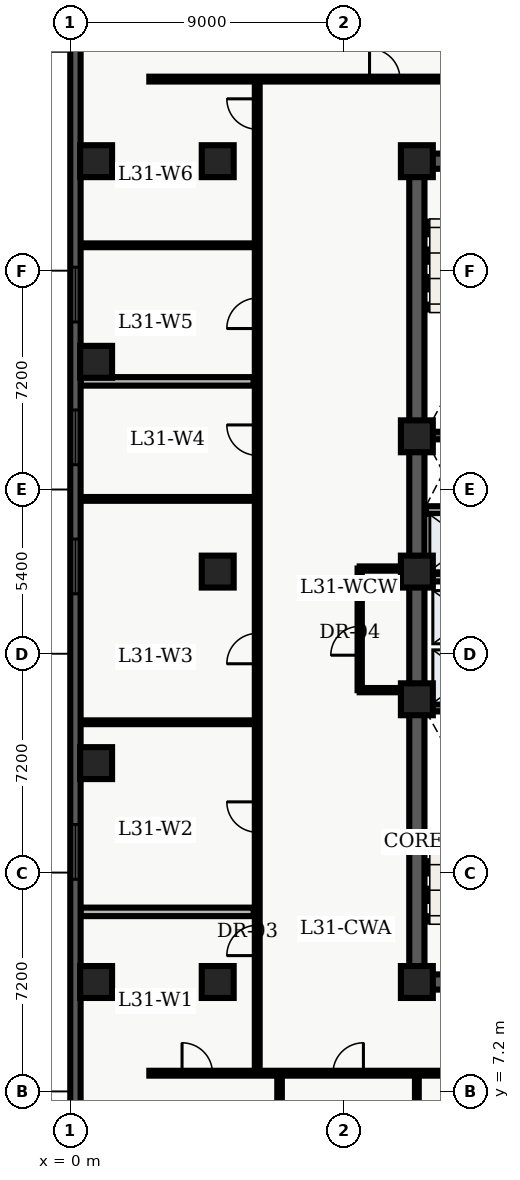
"""IFC4 building model, lengths in metres.
Left out: names, types, materials, properties, quantities, classifications, styles, units other than length and angle.
Written with IfcOpenShell. Run it as: python <this file> out.ifc"""

import sys

from ifc_helpers import new_model, entity, si_unit, converted_unit, direction, frame, origin_with_axes, origin_2d_with_axis, place, context, subcontext, project, spatial, polyline, rectangle, outline, extrude, element, fill, save


model = new_model("IFC4")
c1 = context("Model", 3, precision=1e-05, world=origin_with_axes(), true_north=direction((0.0, 1.0)))
c2 = subcontext(c1, "Body", "Model", "MODEL_VIEW")
j1 = project(units=[si_unit("LENGTHUNIT", "METRE"), converted_unit("PLANEANGLEUNIT", "DEGREE", entity("IfcPlaneAngleMeasure", 0.017), si_unit("PLANEANGLEUNIT", "RADIAN"), dimensions=[0, 0, 0, 0, 0, 0, 0])], contexts=[c1])
p1 = place(None, origin_with_axes())
s1 = spatial("IfcSite", under=j1, at=p1, CompositionType="ELEMENT")
p2 = place(p1, origin_with_axes())
s2 = spatial("IfcBuilding", under=s1, at=p2, CompositionType="ELEMENT")
p3 = place(p2, frame((0.0, 0.0, 129.0), z_axis=(0.0, 0.0, 1.0), x_axis=(1.0, 0.0, 0.0)))
s3 = spatial("IfcBuildingStorey", under=s2, at=p3, CompositionType="ELEMENT", Elevation=129.0)
p4 = place(p3, frame((11.4, 10.8, 0.0), z_axis=(0.0, 0.0, 1.0), x_axis=(0.0, 1.0, 0.0)))
e1 = element("IfcWall", 1, at=p4, inside=s3, PredefinedType="SHEAR", context=c2, shape_type="SweptSolid", body=[
    extrude(outline(polyline([(0.0, -0.25), (27.0, -0.25), (27.0, 0.25), (0.0, 0.25), (0.0, -0.25)])), origin_with_axes(), (0.0, 0.0, 1.0), 3.66),
])
p5 = place(p3, frame((11.4, 10.8, 0.0), z_axis=(0.0, 0.0, 1.0), x_axis=(1.0, 0.0, 0.0)))
e2 = element("IfcWall", 2, at=p5, inside=s3, PredefinedType="SHEAR", context=c2, shape_type="SweptSolid", body=[
    extrude(outline(polyline([(0.0, -0.25), (7.2, -0.25), (7.2, 0.25), (0.0, 0.25), (0.0, -0.25)])), origin_with_axes(), (0.0, 0.0, 1.0), 3.66),
])
p6 = place(p5, frame((2.625, 0.0, 0.0), z_axis=(0.0, 0.0, 1.0), x_axis=(1.0, 0.0, 0.0)))
e3 = element("IfcOpeningElement", 3, at=p6, cuts=e2, PredefinedType="OPENING", context=c2, shape_type="SweptSolid", body=[
    extrude(rectangle(XDim=1.05, YDim=0.52, at=origin_2d_with_axis()), origin_with_axes(), (0.0, 0.0, 1.0), 2.15),
])
p7 = place(p3, frame((11.4, 37.8, 0.0), z_axis=(0.0, 0.0, 1.0), x_axis=(1.0, 0.0, 0.0)))
e4 = element("IfcWall", 4, at=p7, inside=s3, PredefinedType="SHEAR", context=c2, shape_type="SweptSolid", body=[
    extrude(outline(polyline([(0.0, -0.25), (7.2, -0.25), (7.2, 0.25), (0.0, 0.25), (0.0, -0.25)])), origin_with_axes(), (0.0, 0.0, 1.0), 3.66),
])
p8 = place(p7, frame((2.625, 0.0, 0.0), z_axis=(0.0, 0.0, 1.0), x_axis=(1.0, 0.0, 0.0)))
e5 = element("IfcOpeningElement", 5, at=p8, cuts=e4, PredefinedType="OPENING", context=c2, shape_type="SweptSolid", body=[
    extrude(rectangle(XDim=1.05, YDim=0.52, at=origin_2d_with_axis()), origin_with_axes(), (0.0, 0.0, 1.0), 2.15),
])
for number, where, z_axis, x_axis in (
    (6, (11.65, 19.825, 0.0), (0.0, 0.0, 1.0), (1.0, 0.0, 0.0)),
    (7, (11.65, 28.775, 0.0), (0.0, 0.0, 1.0), (1.0, 0.0, 0.0)),
):
    element("IfcWall", number, at=place(p3, frame(where, z_axis=z_axis, x_axis=x_axis)), inside=s3, PredefinedType="SHEAR", context=c2, shape_type="SweptSolid", body=[
        extrude(outline(polyline([(0.0, -0.125), (6.7, -0.125), (6.7, 0.125), (0.0, 0.125), (0.0, -0.125)])), origin_with_axes(), (0.0, 0.0, 1.0), 3.66),
    ])
p9 = place(p3, frame((11.7, 24.1, 0.0), z_axis=(0.0, 0.0, 1.0), x_axis=(1.0, 0.0, 0.0)))
e8 = element("IfcWall", 8, at=p9, inside=s3, PredefinedType="SOLIDWALL", context=c2, shape_type="SweptSolid", body=[
    extrude(outline(polyline([(0.0, -0.125), (6.6, -0.125), (6.6, 0.125), (0.0, 0.125), (0.0, -0.125)])), origin_with_axes(), (0.0, 0.0, 1.0), 2.7),
])
p10 = place(p9, frame((3.75, 0.0, 0.0), z_axis=(0.0, 0.0, 1.0), x_axis=(1.0, 0.0, 0.0)))
e9 = element("IfcOpeningElement", 9, at=p10, cuts=e8, PredefinedType="OPENING", context=c2, shape_type="SweptSolid", body=[
    extrude(rectangle(XDim=0.9, YDim=0.27, at=origin_2d_with_axis()), origin_with_axes(), (0.0, 0.0, 1.0), 2.15),
])
p11 = place(p3, frame((11.7, 26.325, 0.0), z_axis=(0.0, 0.0, 1.0), x_axis=(1.0, 0.0, 0.0)))
e10 = element("IfcWall", 10, at=p11, inside=s3, PredefinedType="SOLIDWALL", context=c2, shape_type="SweptSolid", body=[
    extrude(outline(polyline([(0.0, -0.125), (6.6, -0.125), (6.6, 0.125), (0.0, 0.125), (0.0, -0.125)])), origin_with_axes(), (0.0, 0.0, 1.0), 2.7),
])
p12 = place(p11, frame((3.5, 0.0, 0.0), z_axis=(0.0, 0.0, 1.0), x_axis=(1.0, 0.0, 0.0)))
e11 = element("IfcOpeningElement", 11, at=p12, cuts=e10, PredefinedType="OPENING", context=c2, shape_type="SweptSolid", body=[
    extrude(rectangle(XDim=0.9, YDim=0.27, at=origin_2d_with_axis()), origin_with_axes(), (0.0, 0.0, 1.0), 2.15),
])
for number, where, z_axis, x_axis in (
    (12, (11.4, 10.8, 0.0), (0.0, 0.0, 1.0), (1.0, 0.0, 0.0)),
    (13, (11.4, 20.1, 0.0), (0.0, 0.0, 1.0), (1.0, 0.0, 0.0)),
    (14, (11.4, 24.3, 0.0), (0.0, 0.0, 1.0), (1.0, 0.0, 0.0)),
    (15, (11.4, 28.75, 0.0), (0.0, 0.0, 1.0), (1.0, 0.0, 0.0)),
    (16, (11.4, 37.8, 0.0), (0.0, 0.0, 1.0), (1.0, 0.0, 0.0)),
    (17, (4.85, 10.8, 0.0), (0.0, 0.0, 1.0), (1.0, 0.0, 0.0)),
    (18, (4.85, 24.3, 0.0), (0.0, 0.0, 1.0), (1.0, 0.0, 0.0)),
    (19, (4.85, 37.8, 0.0), (0.0, 0.0, 1.0), (1.0, 0.0, 0.0)),
    (20, (0.85, 10.8, 0.0), (0.0, 0.0, 1.0), (1.0, 0.0, 0.0)),
    (21, (0.85, 18.0, 0.0), (0.0, 0.0, 1.0), (1.0, 0.0, 0.0)),
    (22, (0.85, 31.2, 0.0), (0.0, 0.0, 1.0), (1.0, 0.0, 0.0)),
    (23, (0.85, 37.8, 0.0), (0.0, 0.0, 1.0), (1.0, 0.0, 0.0)),
):
    element("IfcColumn", number, at=place(p3, frame(where, z_axis=z_axis, x_axis=x_axis)), inside=s3, PredefinedType="COLUMN", context=c2, shape_type="SweptSolid", body=[
        extrude(rectangle(XDim=1.05, YDim=1.05, at=origin_2d_with_axis()), origin_with_axes(), (0.0, 0.0, 1.0), 3.9),
    ])
p13 = place(p3, frame((9.52, 20.4, 0.0), z_axis=(0.0, 0.0, 1.0), x_axis=(0.0, 1.0, 0.0)))
e24 = element("IfcWall", 24, at=p13, inside=s3, PredefinedType="PARTITIONING", context=c2, shape_type="SweptSolid", body=[
    extrude(outline(polyline([(0.0, -0.07), (4.0, -0.07), (4.0, 0.07), (0.0, 0.07), (0.0, -0.07)])), origin_with_axes(), (0.0, 0.0, 1.0), 2.7),
])
p14 = place(p13, frame((1.625, 0.0, 0.0), z_axis=(0.0, 0.0, 1.0), x_axis=(1.0, 0.0, 0.0)))
e25 = element("IfcOpeningElement", 25, at=p14, cuts=e24, PredefinedType="OPENING", context=c2, shape_type="SweptSolid", body=[
    extrude(rectangle(XDim=0.95, YDim=0.16, at=origin_2d_with_axis()), origin_with_axes(), (0.0, 0.0, 1.0), 2.15),
])
for number, where, z_axis, x_axis in (
    (26, (9.52, 20.4, 0.0), (0.0, 0.0, 1.0), (1.0, 0.0, 0.0)),
    (27, (9.52, 24.4, 0.0), (0.0, 0.0, 1.0), (1.0, 0.0, 0.0)),
):
    element("IfcWall", number, at=place(p3, frame(where, z_axis=z_axis, x_axis=x_axis)), inside=s3, PredefinedType="PARTITIONING", context=c2, shape_type="SweptSolid", body=[
        extrude(outline(polyline([(0.0, -0.07), (1.58, -0.07), (1.58, 0.07), (0.0, 0.07), (0.0, -0.07)])), origin_with_axes(), (0.0, 0.0, 1.0), 2.7),
    ])
p15 = place(p3, frame((2.6, 7.8, 0.0), z_axis=(0.0, 0.0, 1.0), x_axis=(1.0, 0.0, 0.0)))
e28 = element("IfcWall", 28, at=p15, inside=s3, PredefinedType="PARTITIONING", context=c2, shape_type="SweptSolid", body=[
    extrude(outline(polyline([(0.0, -0.08), (18.55, -0.08), (18.55, 0.08), (0.0, 0.08), (0.0, -0.08)])), origin_with_axes(), (0.0, 0.0, 1.0), 2.7),
])
p16 = place(p15, frame((1.577, 0.0, 0.0), z_axis=(0.0, 0.0, 1.0), x_axis=(1.0, 0.0, 0.0)))
e29 = element("IfcOpeningElement", 29, at=p16, cuts=e28, PredefinedType="OPENING", context=c2, shape_type="SweptSolid", body=[
    extrude(rectangle(XDim=1.0, YDim=0.18, at=origin_2d_with_axis()), origin_with_axes(), (0.0, 0.0, 1.0), 2.15),
])
p17 = place(p15, frame((6.542, 0.0, 0.0), z_axis=(0.0, 0.0, 1.0), x_axis=(1.0, 0.0, 0.0)))
e30 = element("IfcOpeningElement", 30, at=p17, cuts=e28, PredefinedType="OPENING", context=c2, shape_type="SweptSolid", body=[
    extrude(rectangle(XDim=1.0, YDim=0.18, at=origin_2d_with_axis()), origin_with_axes(), (0.0, 0.0, 1.0), 2.15),
])
p18 = place(p15, frame((11.931, 0.0, 0.0), z_axis=(0.0, 0.0, 1.0), x_axis=(1.0, 0.0, 0.0)))
e31 = element("IfcOpeningElement", 31, at=p18, cuts=e28, PredefinedType="OPENING", context=c2, shape_type="SweptSolid", body=[
    extrude(rectangle(XDim=1.0, YDim=0.18, at=origin_2d_with_axis()), origin_with_axes(), (0.0, 0.0, 1.0), 2.15),
])
p19 = place(p15, frame((16.502, 0.0, 0.0), z_axis=(0.0, 0.0, 1.0), x_axis=(1.0, 0.0, 0.0)))
e32 = element("IfcOpeningElement", 32, at=p19, cuts=e28, PredefinedType="OPENING", context=c2, shape_type="SweptSolid", body=[
    extrude(rectangle(XDim=1.0, YDim=0.18, at=origin_2d_with_axis()), origin_with_axes(), (0.0, 0.0, 1.0), 2.15),
])
p20 = place(p3, frame((2.6, 40.5, 0.0), z_axis=(0.0, 0.0, 1.0), x_axis=(1.0, 0.0, 0.0)))
e33 = element("IfcWall", 33, at=p20, inside=s3, PredefinedType="PARTITIONING", context=c2, shape_type="SweptSolid", body=[
    extrude(outline(polyline([(0.0, -0.08), (18.693, -0.08), (18.693, 0.08), (0.0, 0.08), (0.0, -0.08)])), origin_with_axes(), (0.0, 0.0, 1.0), 2.7),
])
p21 = place(p20, frame((7.744, 0.0, 0.0), z_axis=(0.0, 0.0, 1.0), x_axis=(1.0, 0.0, 0.0)))
e34 = element("IfcOpeningElement", 34, at=p21, cuts=e33, PredefinedType="OPENING", context=c2, shape_type="SweptSolid", body=[
    extrude(rectangle(XDim=1.0, YDim=0.18, at=origin_2d_with_axis()), origin_with_axes(), (0.0, 0.0, 1.0), 2.15),
])
p22 = place(p3, frame((6.15, 7.8, 0.0), z_axis=(0.0, 0.0, 1.0), x_axis=(0.0, 1.0, 0.0)))
e35 = element("IfcWall", 35, at=p22, inside=s3, PredefinedType="PARTITIONING", context=c2, shape_type="SweptSolid", body=[
    extrude(outline(polyline([(0.0, -0.08), (32.7, -0.08), (32.7, 0.08), (0.0, 0.08), (0.0, -0.08)])), origin_with_axes(), (0.0, 0.0, 1.0), 2.7),
])
p23 = place(p22, frame((4.368, 0.0, 0.0), z_axis=(0.0, 0.0, 1.0), x_axis=(1.0, 0.0, 0.0)))
e36 = element("IfcOpeningElement", 36, at=p23, cuts=e35, PredefinedType="OPENING", context=c2, shape_type="SweptSolid", body=[
    extrude(rectangle(XDim=1.0, YDim=0.18, at=origin_2d_with_axis()), origin_with_axes(), (0.0, 0.0, 1.0), 2.15),
])
p24 = place(p22, frame((8.425, 0.0, 0.0), z_axis=(0.0, 0.0, 1.0), x_axis=(1.0, 0.0, 0.0)))
e37 = element("IfcOpeningElement", 37, at=p24, cuts=e35, PredefinedType="OPENING", context=c2, shape_type="SweptSolid", body=[
    extrude(rectangle(XDim=1.0, YDim=0.18, at=origin_2d_with_axis()), origin_with_axes(), (0.0, 0.0, 1.0), 2.15),
])
p25 = place(p22, frame((13.968, 0.0, 0.0), z_axis=(0.0, 0.0, 1.0), x_axis=(1.0, 0.0, 0.0)))
e38 = element("IfcOpeningElement", 38, at=p25, cuts=e35, PredefinedType="OPENING", context=c2, shape_type="SweptSolid", body=[
    extrude(rectangle(XDim=1.0, YDim=0.18, at=origin_2d_with_axis()), origin_with_axes(), (0.0, 0.0, 1.0), 2.15),
])
p26 = place(p22, frame((20.824, 0.0, 0.0), z_axis=(0.0, 0.0, 1.0), x_axis=(1.0, 0.0, 0.0)))
e39 = element("IfcOpeningElement", 39, at=p26, cuts=e35, PredefinedType="OPENING", context=c2, shape_type="SweptSolid", body=[
    extrude(rectangle(XDim=1.0, YDim=0.18, at=origin_2d_with_axis()), origin_with_axes(), (0.0, 0.0, 1.0), 2.15),
])
p27 = place(p22, frame((24.995, 0.0, 0.0), z_axis=(0.0, 0.0, 1.0), x_axis=(1.0, 0.0, 0.0)))
e40 = element("IfcOpeningElement", 40, at=p27, cuts=e35, PredefinedType="OPENING", context=c2, shape_type="SweptSolid", body=[
    extrude(rectangle(XDim=1.0, YDim=0.18, at=origin_2d_with_axis()), origin_with_axes(), (0.0, 0.0, 1.0), 2.15),
])
p28 = place(p22, frame((31.551, 0.0, 0.0), z_axis=(0.0, 0.0, 1.0), x_axis=(1.0, 0.0, 0.0)))
e41 = element("IfcOpeningElement", 41, at=p28, cuts=e35, PredefinedType="OPENING", context=c2, shape_type="SweptSolid", body=[
    extrude(rectangle(XDim=1.0, YDim=0.18, at=origin_2d_with_axis()), origin_with_axes(), (0.0, 0.0, 1.0), 2.15),
])
p29 = place(p3, frame((0.335, 13.107, 0.0), z_axis=(0.0, 0.0, 1.0), x_axis=(1.0, 0.0, 0.0)))
e42 = element("IfcWall", 42, at=p29, inside=s3, PredefinedType="PARTITIONING", context=c2, shape_type="SweptSolid", body=[
    extrude(outline(polyline([(0.0, -0.14), (5.695, -0.14), (5.695, 0.14), (0.0, 0.14), (0.0, -0.14)])), origin_with_axes(), (0.0, 0.0, 1.0), 2.7),
])
for number, where, z_axis, x_axis in (
    (43, (0.335, 19.344, 0.0), (0.0, 0.0, 1.0), (1.0, 0.0, 0.0)),
    (44, (0.335, 26.691, 0.0), (0.0, 0.0, 1.0), (1.0, 0.0, 0.0)),
):
    element("IfcWall", number, at=place(p3, frame(where, z_axis=z_axis, x_axis=x_axis)), inside=s3, PredefinedType="PARTITIONING", context=c2, shape_type="SweptSolid", body=[
        extrude(outline(polyline([(0.0, -0.062), (5.695, -0.062), (5.695, 0.062), (0.0, 0.062), (0.0, -0.062)])), origin_with_axes(), (0.0, 0.0, 1.0), 2.7),
    ])
p30 = place(p3, frame((0.335, 30.557, 0.0), z_axis=(0.0, 0.0, 1.0), x_axis=(1.0, 0.0, 0.0)))
e45 = element("IfcWall", 45, at=p30, inside=s3, PredefinedType="PARTITIONING", context=c2, shape_type="SweptSolid", body=[
    extrude(outline(polyline([(0.0, -0.14), (5.695, -0.14), (5.695, 0.14), (0.0, 0.14), (0.0, -0.14)])), origin_with_axes(), (0.0, 0.0, 1.0), 2.7),
])
p31 = place(p3, frame((0.335, 35.033, 0.0), z_axis=(0.0, 0.0, 1.0), x_axis=(1.0, 0.0, 0.0)))
e46 = element("IfcWall", 46, at=p31, inside=s3, PredefinedType="PARTITIONING", context=c2, shape_type="SweptSolid", body=[
    extrude(outline(polyline([(0.0, -0.062), (5.695, -0.062), (5.695, 0.062), (0.0, 0.062), (0.0, -0.062)])), origin_with_axes(), (0.0, 0.0, 1.0), 2.7),
])
p32 = place(p3, frame((6.884, 0.335, 0.0), z_axis=(0.0, 0.0, 1.0), x_axis=(0.0, 1.0, 0.0)))
e47 = element("IfcWall", 47, at=p32, inside=s3, PredefinedType="PARTITIONING", context=c2, shape_type="SweptSolid", body=[
    extrude(outline(polyline([(0.0, -0.075), (7.365, -0.075), (7.365, 0.075), (0.0, 0.075), (0.0, -0.075)])), origin_with_axes(), (0.0, 0.0, 1.0), 2.7),
])
p33 = place(p3, frame((11.4, 0.335, 0.0), z_axis=(0.0, 0.0, 1.0), x_axis=(0.0, 1.0, 0.0)))
e48 = element("IfcWall", 48, at=p33, inside=s3, PredefinedType="PARTITIONING", context=c2, shape_type="SweptSolid", body=[
    extrude(outline(polyline([(0.0, -0.062), (7.365, -0.062), (7.365, 0.062), (0.0, 0.062), (0.0, -0.062)])), origin_with_axes(), (0.0, 0.0, 1.0), 2.7),
])
p34 = place(p3, frame((0.17, 2.74, 0.0), z_axis=(0.0, 0.0, 1.0), x_axis=(0.0, 1.0, 0.0)))
e49 = element("IfcWall", 49, at=p34, inside=s3, PredefinedType="SOLIDWALL", context=c2, shape_type="SweptSolid", body=[
    extrude(outline(polyline([(0.0, -0.17), (43.46, -0.17), (43.46, 0.17), (0.0, 0.17), (0.0, -0.17)])), origin_with_axes(), (0.0, 0.0, 1.0), 3.66),
])
p35 = place(p34, frame((2.948, 0.0, 0.45), z_axis=(0.0, 0.0, 1.0), x_axis=(1.0, 0.0, 0.0)))
e50 = element("IfcOpeningElement", 50, at=p35, cuts=e49, PredefinedType="OPENING", context=c2, shape_type="SweptSolid", body=[
    extrude(rectangle(XDim=1.8, YDim=0.36, at=origin_2d_with_axis()), origin_with_axes(), (0.0, 0.0, 1.0), 2.1),
])
p36 = place(p34, frame((12.339, 0.0, 0.45), z_axis=(0.0, 0.0, 1.0), x_axis=(1.0, 0.0, 0.0)))
e51 = element("IfcOpeningElement", 51, at=p36, cuts=e49, PredefinedType="OPENING", context=c2, shape_type="SweptSolid", body=[
    extrude(rectangle(XDim=1.8, YDim=0.36, at=origin_2d_with_axis()), origin_with_axes(), (0.0, 0.0, 1.0), 2.1),
])
p37 = place(p34, frame((21.73, 0.0, 0.45), z_axis=(0.0, 0.0, 1.0), x_axis=(1.0, 0.0, 0.0)))
e52 = element("IfcOpeningElement", 52, at=p37, cuts=e49, PredefinedType="OPENING", context=c2, shape_type="SweptSolid", body=[
    extrude(rectangle(XDim=1.8, YDim=0.36, at=origin_2d_with_axis()), origin_with_axes(), (0.0, 0.0, 1.0), 2.1),
])
p38 = place(p34, frame((25.976, 0.0, 0.45), z_axis=(0.0, 0.0, 1.0), x_axis=(1.0, 0.0, 0.0)))
e53 = element("IfcOpeningElement", 53, at=p38, cuts=e49, PredefinedType="OPENING", context=c2, shape_type="SweptSolid", body=[
    extrude(rectangle(XDim=1.8, YDim=0.36, at=origin_2d_with_axis()), origin_with_axes(), (0.0, 0.0, 1.0), 2.1),
])
p39 = place(p34, frame((30.671, 0.0, 0.45), z_axis=(0.0, 0.0, 1.0), x_axis=(1.0, 0.0, 0.0)))
e54 = element("IfcOpeningElement", 54, at=p39, cuts=e49, PredefinedType="OPENING", context=c2, shape_type="SweptSolid", body=[
    extrude(rectangle(XDim=1.8, YDim=0.36, at=origin_2d_with_axis()), origin_with_axes(), (0.0, 0.0, 1.0), 2.1),
])
p40 = place(p34, frame((40.062, 0.0, 0.45), z_axis=(0.0, 0.0, 1.0), x_axis=(1.0, 0.0, 0.0)))
e55 = element("IfcOpeningElement", 55, at=p40, cuts=e49, PredefinedType="OPENING", context=c2, shape_type="SweptSolid", body=[
    extrude(rectangle(XDim=1.8, YDim=0.36, at=origin_2d_with_axis()), origin_with_axes(), (0.0, 0.0, 1.0), 2.1),
])
p41 = place(p13, frame((1.625, 0.0, 0.0), z_axis=(0.0, 0.0, 1.0), x_axis=(1.0, 0.0, 0.0)))
e56 = element("IfcDoor", 56, at=p41, inside=s3, OperationType="SINGLE_SWING_LEFT", PredefinedType="DOOR", context=c2, shape_type="SweptSolid", body=[
    extrude(rectangle(XDim=0.95, YDim=0.084, at=origin_2d_with_axis()), origin_with_axes(), (0.0, 0.0, 1.0), 2.15),
])
fill(e25, e56)
p42 = place(p22, frame((4.368, 0.0, 0.0), z_axis=(0.0, 0.0, 1.0), x_axis=(1.0, 0.0, 0.0)))
e57 = element("IfcDoor", 57, at=p42, inside=s3, OperationType="SINGLE_SWING_LEFT", PredefinedType="DOOR", context=c2, shape_type="SweptSolid", body=[
    extrude(rectangle(XDim=1.0, YDim=0.09, at=origin_2d_with_axis()), origin_with_axes(), (0.0, 0.0, 1.0), 2.15),
])
fill(e36, e57)
p43 = place(p22, frame((8.425, 0.0, 0.0), z_axis=(0.0, 0.0, 1.0), x_axis=(1.0, 0.0, 0.0)))
e58 = element("IfcDoor", 58, at=p43, inside=s3, OperationType="SINGLE_SWING_RIGHT", PredefinedType="DOOR", context=c2, shape_type="SweptSolid", body=[
    extrude(rectangle(XDim=1.0, YDim=0.09, at=origin_2d_with_axis()), origin_with_axes(), (0.0, 0.0, 1.0), 2.15),
])
fill(e37, e58)
p44 = place(p22, frame((13.968, 0.0, 0.0), z_axis=(0.0, 0.0, 1.0), x_axis=(1.0, 0.0, 0.0)))
e59 = element("IfcDoor", 59, at=p44, inside=s3, OperationType="SINGLE_SWING_LEFT", PredefinedType="DOOR", context=c2, shape_type="SweptSolid", body=[
    extrude(rectangle(XDim=1.0, YDim=0.09, at=origin_2d_with_axis()), origin_with_axes(), (0.0, 0.0, 1.0), 2.15),
])
fill(e38, e59)
p45 = place(p22, frame((20.824, 0.0, 0.0), z_axis=(0.0, 0.0, 1.0), x_axis=(1.0, 0.0, 0.0)))
e60 = element("IfcDoor", 60, at=p45, inside=s3, OperationType="SINGLE_SWING_RIGHT", PredefinedType="DOOR", context=c2, shape_type="SweptSolid", body=[
    extrude(rectangle(XDim=1.0, YDim=0.09, at=origin_2d_with_axis()), origin_with_axes(), (0.0, 0.0, 1.0), 2.15),
])
fill(e39, e60)
p46 = place(p22, frame((24.995, 0.0, 0.0), z_axis=(0.0, 0.0, 1.0), x_axis=(1.0, 0.0, 0.0)))
e61 = element("IfcDoor", 61, at=p46, inside=s3, OperationType="SINGLE_SWING_LEFT", PredefinedType="DOOR", context=c2, shape_type="SweptSolid", body=[
    extrude(rectangle(XDim=1.0, YDim=0.09, at=origin_2d_with_axis()), origin_with_axes(), (0.0, 0.0, 1.0), 2.15),
])
fill(e40, e61)
p47 = place(p22, frame((31.551, 0.0, 0.0), z_axis=(0.0, 0.0, 1.0), x_axis=(1.0, 0.0, 0.0)))
e62 = element("IfcDoor", 62, at=p47, inside=s3, OperationType="SINGLE_SWING_RIGHT", PredefinedType="DOOR", context=c2, shape_type="SweptSolid", body=[
    extrude(rectangle(XDim=1.0, YDim=0.09, at=origin_2d_with_axis()), origin_with_axes(), (0.0, 0.0, 1.0), 2.15),
])
fill(e41, e62)
p48 = place(p15, frame((1.577, 0.0, 0.0), z_axis=(0.0, 0.0, 1.0), x_axis=(1.0, 0.0, 0.0)))
e63 = element("IfcDoor", 63, at=p48, inside=s3, OperationType="SINGLE_SWING_LEFT", PredefinedType="DOOR", context=c2, shape_type="SweptSolid", body=[
    extrude(rectangle(XDim=1.0, YDim=0.09, at=origin_2d_with_axis()), origin_with_axes(), (0.0, 0.0, 1.0), 2.15),
])
fill(e29, e63)
p49 = place(p15, frame((6.542, 0.0, 0.0), z_axis=(0.0, 0.0, 1.0), x_axis=(1.0, 0.0, 0.0)))
e64 = element("IfcDoor", 64, at=p49, inside=s3, OperationType="SINGLE_SWING_RIGHT", PredefinedType="DOOR", context=c2, shape_type="SweptSolid", body=[
    extrude(rectangle(XDim=1.0, YDim=0.09, at=origin_2d_with_axis()), origin_with_axes(), (0.0, 0.0, 1.0), 2.15),
])
fill(e30, e64)
p50 = place(p20, frame((7.744, 0.0, 0.0), z_axis=(0.0, 0.0, 1.0), x_axis=(1.0, 0.0, 0.0)))
e65 = element("IfcDoor", 65, at=p50, inside=s3, OperationType="SINGLE_SWING_LEFT", PredefinedType="DOOR", context=c2, shape_type="SweptSolid", body=[
    extrude(rectangle(XDim=1.0, YDim=0.09, at=origin_2d_with_axis()), origin_with_axes(), (0.0, 0.0, 1.0), 2.15),
])
fill(e34, e65)
p51 = place(p34, frame((12.339, 0.0, 0.45), z_axis=(0.0, 0.0, 1.0), x_axis=(1.0, 0.0, 0.0)))
e66 = element("IfcWindow", 66, at=p51, inside=s3, PredefinedType="WINDOW", context=c2, shape_type="SweptSolid", body=[
    extrude(rectangle(XDim=1.8, YDim=0.09, at=origin_2d_with_axis()), origin_with_axes(), (0.0, 0.0, 1.0), 2.1),
])
fill(e51, e66)
p52 = place(p34, frame((21.73, 0.0, 0.45), z_axis=(0.0, 0.0, 1.0), x_axis=(1.0, 0.0, 0.0)))
e67 = element("IfcWindow", 67, at=p52, inside=s3, PredefinedType="WINDOW", context=c2, shape_type="SweptSolid", body=[
    extrude(rectangle(XDim=1.8, YDim=0.09, at=origin_2d_with_axis()), origin_with_axes(), (0.0, 0.0, 1.0), 2.1),
])
fill(e52, e67)
p53 = place(p34, frame((25.976, 0.0, 0.45), z_axis=(0.0, 0.0, 1.0), x_axis=(1.0, 0.0, 0.0)))
e68 = element("IfcWindow", 68, at=p53, inside=s3, PredefinedType="WINDOW", context=c2, shape_type="SweptSolid", body=[
    extrude(rectangle(XDim=1.8, YDim=0.09, at=origin_2d_with_axis()), origin_with_axes(), (0.0, 0.0, 1.0), 2.1),
])
fill(e53, e68)
p54 = place(p34, frame((30.671, 0.0, 0.45), z_axis=(0.0, 0.0, 1.0), x_axis=(1.0, 0.0, 0.0)))
e69 = element("IfcWindow", 69, at=p54, inside=s3, PredefinedType="WINDOW", context=c2, shape_type="SweptSolid", body=[
    extrude(rectangle(XDim=1.8, YDim=0.09, at=origin_2d_with_axis()), origin_with_axes(), (0.0, 0.0, 1.0), 2.1),
])
fill(e54, e69)
save(model, sys.argv[1])
